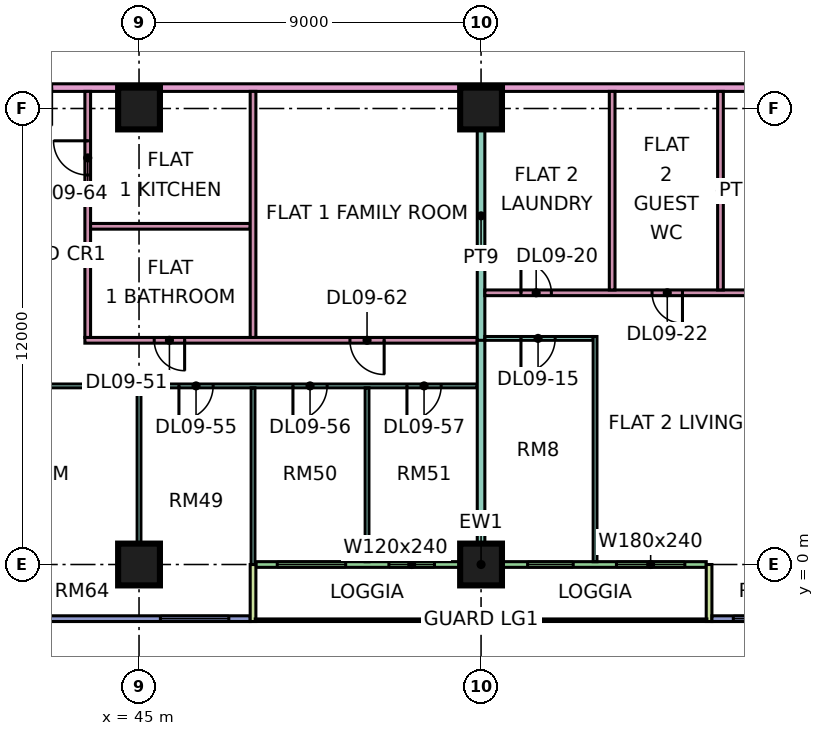
"""IFC4 building model, lengths in metres.
Left out: names, types, materials, properties, quantities, classifications, styles, units other than length and angle.
Written with IfcOpenShell. Run it as: python <this file> out.ifc"""

import sys

from ifc_helpers import new_model, si_unit, direction, frame, frame_2d, origin, origin_2d, place, context, subcontext, project, spatial, rectangle, extrude, element, fill, save


model = new_model("IFC4")
c1 = context("Model", 3, precision=1e-05, world=origin(), true_north=direction((0.0, 1.0)))
c2 = subcontext(c1, "Body", "Model", "MODEL_VIEW")
j1 = project(units=[si_unit("LENGTHUNIT", "METRE"), si_unit("PLANEANGLEUNIT", "RADIAN")], contexts=[c1])
p1 = place(None, origin())
s1 = spatial("IfcSite", under=j1, at=p1, CompositionType="ELEMENT")
p2 = place(p1, origin())
s2 = spatial("IfcBuilding", under=s1, at=p2, CompositionType="ELEMENT")
p3 = place(p2, frame((0.0, 0.0, 48.9)))
s3 = spatial("IfcBuildingStorey", under=s2, at=p3, CompositionType="ELEMENT", Elevation=48.9)
for number, where, z_axis, x_axis in (
    (1, (45.0, 0.0, 0.0), (0.0, 0.0, 1.0), (1.0, 0.0, 0.0)),
    (2, (45.0, 12.0, 0.0), (0.0, 0.0, 1.0), (1.0, 0.0, 0.0)),
    (3, (54.0, 0.0, 0.0), (0.0, 0.0, 1.0), (1.0, 0.0, 0.0)),
    (4, (54.0, 12.0, 0.0), (0.0, 0.0, 1.0), (1.0, 0.0, 0.0)),
):
    element("IfcColumn", number, at=place(p3, frame(where, z_axis=z_axis, x_axis=x_axis)), inside=s3, PredefinedType="COLUMN", context=c2, shape_type="SweptSolid", body=[
        extrude(rectangle(XDim=1.1, YDim=1.1, at=origin_2d()), origin(), (0.0, 0.0, 1.0), 3.75),
    ])
p4 = place(p3, frame((36.075, -1.425, 0.0), z_axis=(0.0, 0.0, 1.0), x_axis=(1.0, 0.0, 0.0)))
e5 = element("IfcWall", 5, at=p4, inside=s3, PredefinedType="SOLIDWALL", context=c2, shape_type="SweptSolid", body=[
    extrude(rectangle(XDim=11.85, YDim=0.15, at=frame_2d((5.925, 0.0))), origin(), (0.0, 0.0, 1.0), 3.35),
])
p5 = place(p4, frame((2.962, 0.0, 0.45)))
e6 = element("IfcOpeningElement", 6, at=p5, cuts=e5, PredefinedType="OPENING", context=c2, shape_type="SweptSolid", body=[
    extrude(rectangle(XDim=3.0, YDim=2.4, at=frame_2d((1.5, 1.2))), frame((0.0, 0.085, 0.0), z_axis=(0.0, -1.0, 0.0), x_axis=(1.0, 0.0, 0.0)), (0.0, 0.0, 1.0), 0.17),
])
p6 = place(p4, frame((9.488, 0.0, 0.45)))
e7 = element("IfcOpeningElement", 7, at=p6, cuts=e5, PredefinedType="OPENING", context=c2, shape_type="SweptSolid", body=[
    extrude(rectangle(XDim=1.8, YDim=2.4, at=frame_2d((0.9, 1.2))), frame((0.0, 0.085, 0.0), z_axis=(0.0, -1.0, 0.0), x_axis=(1.0, 0.0, 0.0)), (0.0, 0.0, 1.0), 0.17),
])
p7 = place(p3, frame((48.075, 0.0, 0.0), z_axis=(0.0, 0.0, 1.0), x_axis=(1.0, 0.0, 0.0)))
e8 = element("IfcWall", 8, at=p7, inside=s3, PredefinedType="SOLIDWALL", context=c2, shape_type="SweptSolid", body=[
    extrude(rectangle(XDim=11.85, YDim=0.15, at=frame_2d((5.925, 0.0))), origin(), (0.0, 0.0, 1.0), 3.35),
])
p8 = place(p7, frame((0.562, 0.0, 0.45)))
e9 = element("IfcOpeningElement", 9, at=p8, cuts=e8, PredefinedType="OPENING", context=c2, shape_type="SweptSolid", body=[
    extrude(rectangle(XDim=1.8, YDim=2.4, at=frame_2d((0.9, 1.2))), frame((0.0, 0.085, 0.0), z_axis=(0.0, -1.0, 0.0), x_axis=(1.0, 0.0, 0.0)), (0.0, 0.0, 1.0), 0.17),
])
p9 = place(p7, frame((3.5, 0.0, 0.45)))
e10 = element("IfcOpeningElement", 10, at=p9, cuts=e8, PredefinedType="OPENING", context=c2, shape_type="SweptSolid", body=[
    extrude(rectangle(XDim=1.2, YDim=2.4, at=frame_2d((0.6, 1.2))), frame((0.0, 0.085, 0.0), z_axis=(0.0, -1.0, 0.0), x_axis=(1.0, 0.0, 0.0)), (0.0, 0.0, 1.0), 0.17),
])
p10 = place(p7, frame((7.15, 0.0, 0.45)))
e11 = element("IfcOpeningElement", 11, at=p10, cuts=e8, PredefinedType="OPENING", context=c2, shape_type="SweptSolid", body=[
    extrude(rectangle(XDim=1.2, YDim=2.4, at=frame_2d((0.6, 1.2))), frame((0.0, 0.085, 0.0), z_axis=(0.0, -1.0, 0.0), x_axis=(1.0, 0.0, 0.0)), (0.0, 0.0, 1.0), 0.17),
])
p11 = place(p7, frame((9.488, 0.0, 0.45)))
e12 = element("IfcOpeningElement", 12, at=p11, cuts=e8, PredefinedType="OPENING", context=c2, shape_type="SweptSolid", body=[
    extrude(rectangle(XDim=1.8, YDim=2.4, at=frame_2d((0.9, 1.2))), frame((0.0, 0.085, 0.0), z_axis=(0.0, -1.0, 0.0), x_axis=(1.0, 0.0, 0.0)), (0.0, 0.0, 1.0), 0.17),
])
for number, where, z_axis, x_axis in (
    (13, (48.0, -1.5, 0.0), (0.0, 0.0, 1.0), (0.0, 1.0, 0.0)),
    (14, (60.0, -1.5, 0.0), (0.0, 0.0, 1.0), (0.0, 1.0, 0.0)),
):
    element("IfcWall", number, at=place(p3, frame(where, z_axis=z_axis, x_axis=x_axis)), inside=s3, PredefinedType="SOLIDWALL", context=c2, shape_type="SweptSolid", body=[
        extrude(rectangle(XDim=1.5, YDim=0.15, at=frame_2d((0.75, 0.0))), origin(), (0.0, 0.0, 1.0), 3.35),
    ])
p12 = place(p3, frame((60.075, -1.425, 0.0), z_axis=(0.0, 0.0, 1.0), x_axis=(1.0, 0.0, 0.0)))
e15 = element("IfcWall", 15, at=p12, inside=s3, PredefinedType="SOLIDWALL", context=c2, shape_type="SweptSolid", body=[
    extrude(rectangle(XDim=10.425, YDim=0.15, at=frame_2d((5.212, 0.0))), origin(), (0.0, 0.0, 1.0), 3.35),
])
p13 = place(p12, frame((0.562, 0.0, 0.45)))
e16 = element("IfcOpeningElement", 16, at=p13, cuts=e15, PredefinedType="OPENING", context=c2, shape_type="SweptSolid", body=[
    extrude(rectangle(XDim=1.8, YDim=2.4, at=frame_2d((0.9, 1.2))), frame((0.0, 0.085, 0.0), z_axis=(0.0, -1.0, 0.0), x_axis=(1.0, 0.0, 0.0)), (0.0, 0.0, 1.0), 0.17),
])
p14 = place(p12, frame((3.525, 0.0, 0.45)))
e17 = element("IfcOpeningElement", 17, at=p14, cuts=e15, PredefinedType="OPENING", context=c2, shape_type="SweptSolid", body=[
    extrude(rectangle(XDim=1.8, YDim=2.4, at=frame_2d((0.9, 1.2))), frame((0.0, 0.085, 0.0), z_axis=(0.0, -1.0, 0.0), x_axis=(1.0, 0.0, 0.0)), (0.0, 0.0, 1.0), 0.17),
])
p15 = place(p12, frame((6.675, 0.0, 0.45)))
e18 = element("IfcOpeningElement", 18, at=p15, cuts=e15, PredefinedType="OPENING", context=c2, shape_type="SweptSolid", body=[
    extrude(rectangle(XDim=3.0, YDim=2.4, at=frame_2d((1.5, 1.2))), frame((0.0, 0.085, 0.0), z_axis=(0.0, -1.0, 0.0), x_axis=(1.0, 0.0, 0.0)), (0.0, 0.0, 1.0), 0.17),
])
p16 = place(p3, frame((33.05, 4.7, 0.0), z_axis=(0.0, 0.0, 1.0), x_axis=(1.0, 0.0, 0.0)))
e19 = element("IfcWall", 19, at=p16, inside=s3, PredefinedType="PARTITIONING", context=c2, shape_type="SweptSolid", body=[
    extrude(rectangle(XDim=20.85, YDim=0.1, at=frame_2d((10.425, 0.0))), origin(), (0.0, 0.0, 1.0), 3.35),
])
p17 = place(p16, frame((1.0, 0.0, 0.0)))
e20 = element("IfcOpeningElement", 20, at=p17, cuts=e19, PredefinedType="OPENING", context=c2, shape_type="SweptSolid", body=[
    extrude(rectangle(XDim=0.9, YDim=2.1, at=frame_2d((0.45, 1.05))), frame((0.0, 0.06, 0.0), z_axis=(0.0, -1.0, 0.0), x_axis=(1.0, 0.0, 0.0)), (0.0, 0.0, 1.0), 0.12),
])
p18 = place(p16, frame((13.0, 0.0, 0.0)))
e21 = element("IfcOpeningElement", 21, at=p18, cuts=e19, PredefinedType="OPENING", context=c2, shape_type="SweptSolid", body=[
    extrude(rectangle(XDim=0.9, YDim=2.1, at=frame_2d((0.45, 1.05))), frame((0.0, 0.06, 0.0), z_axis=(0.0, -1.0, 0.0), x_axis=(1.0, 0.0, 0.0)), (0.0, 0.0, 1.0), 0.12),
])
p19 = place(p16, frame((16.0, 0.0, 0.0)))
e22 = element("IfcOpeningElement", 22, at=p19, cuts=e19, PredefinedType="OPENING", context=c2, shape_type="SweptSolid", body=[
    extrude(rectangle(XDim=0.9, YDim=2.1, at=frame_2d((0.45, 1.05))), frame((0.0, 0.06, 0.0), z_axis=(0.0, -1.0, 0.0), x_axis=(1.0, 0.0, 0.0)), (0.0, 0.0, 1.0), 0.12),
])
p20 = place(p16, frame((19.0, 0.0, 0.0)))
e23 = element("IfcOpeningElement", 23, at=p20, cuts=e19, PredefinedType="OPENING", context=c2, shape_type="SweptSolid", body=[
    extrude(rectangle(XDim=0.9, YDim=2.1, at=frame_2d((0.45, 1.05))), frame((0.0, 0.06, 0.0), z_axis=(0.0, -1.0, 0.0), x_axis=(1.0, 0.0, 0.0)), (0.0, 0.0, 1.0), 0.12),
])
p21 = place(p16, frame((7.0, 0.0, 0.0)))
e24 = element("IfcOpeningElement", 24, at=p21, cuts=e19, PredefinedType="OPENING", context=c2, shape_type="SweptSolid", body=[
    extrude(rectangle(XDim=0.9, YDim=2.1, at=frame_2d((0.45, 1.05))), frame((0.0, 0.06, 0.0), z_axis=(0.0, -1.0, 0.0), x_axis=(1.0, 0.0, 0.0)), (0.0, 0.0, 1.0), 0.12),
])
p22 = place(p3, frame((40.65, 12.55, 0.0), z_axis=(0.0, 0.0, 1.0), x_axis=(1.0, 0.0, 0.0)))
e25 = element("IfcWall", 25, at=p22, inside=s3, PredefinedType="PARTITIONING", context=c2, shape_type="SweptSolid", body=[
    extrude(rectangle(XDim=31.35, YDim=0.2, at=frame_2d((15.675, 0.0))), origin(), (0.0, 0.0, 1.0), 3.35),
])
p23 = place(p22, frame((24.0, 0.0, 0.0)))
e26 = element("IfcOpeningElement", 26, at=p23, cuts=e25, PredefinedType="OPENING", context=c2, shape_type="SweptSolid", body=[
    extrude(rectangle(XDim=1.0, YDim=2.1, at=frame_2d((0.5, 1.05))), frame((0.0, 0.11, 0.0), z_axis=(0.0, -1.0, 0.0), x_axis=(1.0, 0.0, 0.0)), (0.0, 0.0, 1.0), 0.22),
])
p24 = place(p22, frame((1.05, 0.0, 0.0)))
e27 = element("IfcOpeningElement", 27, at=p24, cuts=e25, PredefinedType="OPENING", context=c2, shape_type="SweptSolid", body=[
    extrude(rectangle(XDim=1.0, YDim=2.1, at=frame_2d((0.5, 1.05))), frame((0.0, 0.11, 0.0), z_axis=(0.0, -1.0, 0.0), x_axis=(1.0, 0.0, 0.0)), (0.0, 0.0, 1.0), 0.22),
])
p25 = place(p3, frame((43.575, 5.9, 0.0), z_axis=(0.0, 0.0, 1.0), x_axis=(1.0, 0.0, 0.0)))
e28 = element("IfcWall", 28, at=p25, inside=s3, PredefinedType="PARTITIONING", context=c2, shape_type="SweptSolid", body=[
    extrude(rectangle(XDim=10.325, YDim=0.15, at=frame_2d((5.163, 0.0))), origin(), (0.0, 0.0, 1.0), 3.35),
])
p26 = place(p25, frame((1.825, 0.0, 0.0)))
e29 = element("IfcOpeningElement", 29, at=p26, cuts=e28, PredefinedType="OPENING", context=c2, shape_type="SweptSolid", body=[
    extrude(rectangle(XDim=0.8, YDim=2.1, at=frame_2d((0.4, 1.05))), frame((0.0, 0.085, 0.0), z_axis=(0.0, -1.0, 0.0), x_axis=(1.0, 0.0, 0.0)), (0.0, 0.0, 1.0), 0.17),
])
p27 = place(p25, frame((6.975, 0.0, 0.0)))
e30 = element("IfcOpeningElement", 30, at=p27, cuts=e28, PredefinedType="OPENING", context=c2, shape_type="SweptSolid", body=[
    extrude(rectangle(XDim=0.9, YDim=2.1, at=frame_2d((0.45, 1.05))), frame((0.0, 0.085, 0.0), z_axis=(0.0, -1.0, 0.0), x_axis=(1.0, 0.0, 0.0)), (0.0, 0.0, 1.0), 0.17),
])
p28 = place(p3, frame((43.65, 5.975, 0.0), z_axis=(0.0, 0.0, 1.0), x_axis=(0.0, 1.0, 0.0)))
e31 = element("IfcWall", 31, at=p28, inside=s3, PredefinedType="PARTITIONING", context=c2, shape_type="SweptSolid", body=[
    extrude(rectangle(XDim=6.475, YDim=0.15, at=frame_2d((3.237, 0.0))), origin(), (0.0, 0.0, 1.0), 3.35),
])
p29 = place(p28, frame((4.275, 0.0, 0.0)))
e32 = element("IfcOpeningElement", 32, at=p29, cuts=e31, PredefinedType="OPENING", context=c2, shape_type="SweptSolid", body=[
    extrude(rectangle(XDim=0.9, YDim=2.1, at=frame_2d((0.45, 1.05))), frame((0.0, 0.085, 0.0), z_axis=(0.0, -1.0, 0.0), x_axis=(1.0, 0.0, 0.0)), (0.0, 0.0, 1.0), 0.17),
])
p30 = place(p3, frame((43.725, 8.9, 0.0), z_axis=(0.0, 0.0, 1.0), x_axis=(1.0, 0.0, 0.0)))
e33 = element("IfcWall", 33, at=p30, inside=s3, PredefinedType="PARTITIONING", context=c2, shape_type="SweptSolid", body=[
    extrude(rectangle(XDim=4.2, YDim=0.15, at=frame_2d((2.1, 0.0))), origin(), (0.0, 0.0, 1.0), 3.35),
])
for number, where, z_axis, x_axis in (
    (34, (45.0, 0.0, 0.0), (0.0, 0.0, 1.0), (0.0, 1.0, 0.0)),
    (35, (48.0, 0.0, 0.0), (0.0, 0.0, 1.0), (0.0, 1.0, 0.0)),
):
    element("IfcWall", number, at=place(p3, frame(where, z_axis=z_axis, x_axis=x_axis)), inside=s3, PredefinedType="PARTITIONING", context=c2, shape_type="SweptSolid", body=[
        extrude(rectangle(XDim=4.65, YDim=0.1, at=frame_2d((2.325, 0.0))), origin(), (0.0, 0.0, 1.0), 3.35),
    ])
p31 = place(p3, frame((48.0, 5.975, 0.0), z_axis=(0.0, 0.0, 1.0), x_axis=(0.0, 1.0, 0.0)))
e36 = element("IfcWall", 36, at=p31, inside=s3, PredefinedType="PARTITIONING", context=c2, shape_type="SweptSolid", body=[
    extrude(rectangle(XDim=6.475, YDim=0.15, at=frame_2d((3.237, 0.0))), origin(), (0.0, 0.0, 1.0), 3.35),
])
p32 = place(p3, frame((51.0, 0.074, 0.0), z_axis=(0.0, 0.0, 1.0), x_axis=(0.0, 1.0, 0.0)))
e37 = element("IfcWall", 37, at=p32, inside=s3, PredefinedType="PARTITIONING", context=c2, shape_type="SweptSolid", body=[
    extrude(rectangle(XDim=4.576, YDim=0.1, at=frame_2d((2.288, 0.0))), origin(), (0.0, 0.0, 1.0), 3.35),
])
p33 = place(p3, frame((54.0, 0.074, 0.0), z_axis=(0.0, 0.0, 1.0), x_axis=(0.0, 1.0, 0.0)))
e38 = element("IfcWall", 38, at=p33, inside=s3, PredefinedType="PARTITIONING", context=c2, shape_type="SweptSolid", body=[
    extrude(rectangle(XDim=5.901, YDim=0.2, at=frame_2d((2.951, 0.0))), origin(), (0.0, 0.0, 1.0), 3.35),
])
p34 = place(p3, frame((54.0, 5.9, 0.0), z_axis=(0.0, 0.0, 1.0), x_axis=(0.0, 1.0, 0.0)))
e39 = element("IfcWall", 39, at=p34, inside=s3, PredefinedType="PARTITIONING", context=c2, shape_type="SweptSolid", body=[
    extrude(rectangle(XDim=6.55, YDim=0.2, at=frame_2d((3.275, 0.0))), origin(), (0.0, 0.0, 1.0), 3.35),
])
p35 = place(p3, frame((54.1, 5.95, 0.0), z_axis=(0.0, 0.0, 1.0), x_axis=(1.0, 0.0, 0.0)))
e40 = element("IfcWall", 40, at=p35, inside=s3, PredefinedType="PARTITIONING", context=c2, shape_type="SweptSolid", body=[
    extrude(rectangle(XDim=2.85, YDim=0.1, at=frame_2d((1.425, 0.0))), origin(), (0.0, 0.0, 1.0), 3.35),
])
p36 = place(p35, frame((0.95, 0.0, 0.0)))
e41 = element("IfcOpeningElement", 41, at=p36, cuts=e40, PredefinedType="OPENING", context=c2, shape_type="SweptSolid", body=[
    extrude(rectangle(XDim=0.9, YDim=2.1, at=frame_2d((0.45, 1.05))), frame((0.0, 0.06, 0.0), z_axis=(0.0, -1.0, 0.0), x_axis=(1.0, 0.0, 0.0)), (0.0, 0.0, 1.0), 0.12),
])
p37 = place(p3, frame((54.1, 7.15, 0.0), z_axis=(0.0, 0.0, 1.0), x_axis=(1.0, 0.0, 0.0)))
e42 = element("IfcWall", 42, at=p37, inside=s3, PredefinedType="PARTITIONING", context=c2, shape_type="SweptSolid", body=[
    extrude(rectangle(XDim=9.575, YDim=0.15, at=frame_2d((4.788, 0.0))), origin(), (0.0, 0.0, 1.0), 3.35),
])
p38 = place(p37, frame((7.55, 0.0, 0.0)))
e43 = element("IfcOpeningElement", 43, at=p38, cuts=e42, PredefinedType="OPENING", context=c2, shape_type="SweptSolid", body=[
    extrude(rectangle(XDim=0.8, YDim=2.1, at=frame_2d((0.4, 1.05))), frame((0.0, 0.085, 0.0), z_axis=(0.0, -1.0, 0.0), x_axis=(1.0, 0.0, 0.0)), (0.0, 0.0, 1.0), 0.17),
])
p39 = place(p37, frame((0.95, 0.0, 0.0)))
e44 = element("IfcOpeningElement", 44, at=p39, cuts=e42, PredefinedType="OPENING", context=c2, shape_type="SweptSolid", body=[
    extrude(rectangle(XDim=0.8, YDim=2.1, at=frame_2d((0.4, 1.05))), frame((0.0, 0.085, 0.0), z_axis=(0.0, -1.0, 0.0), x_axis=(1.0, 0.0, 0.0)), (0.0, 0.0, 1.0), 0.17),
])
p40 = place(p37, frame((4.4, 0.0, 0.0)))
e45 = element("IfcOpeningElement", 45, at=p40, cuts=e42, PredefinedType="OPENING", context=c2, shape_type="SweptSolid", body=[
    extrude(rectangle(XDim=0.8, YDim=2.1, at=frame_2d((0.4, 1.05))), frame((0.0, 0.085, 0.0), z_axis=(0.0, -1.0, 0.0), x_axis=(1.0, 0.0, 0.0)), (0.0, 0.0, 1.0), 0.17),
])
p41 = place(p3, frame((57.0, 0.074, 0.0), z_axis=(0.0, 0.0, 1.0), x_axis=(0.0, 1.0, 0.0)))
e46 = element("IfcWall", 46, at=p41, inside=s3, PredefinedType="PARTITIONING", context=c2, shape_type="SweptSolid", body=[
    extrude(rectangle(XDim=5.926, YDim=0.1, at=frame_2d((2.963, 0.0))), origin(), (0.0, 0.0, 1.0), 3.35),
])
for number, where, z_axis, x_axis in (
    (47, (57.45, 7.225, 0.0), (0.0, 0.0, 1.0), (0.0, 1.0, 0.0)),
    (48, (60.3, 7.225, 0.0), (0.0, 0.0, 1.0), (0.0, 1.0, 0.0)),
):
    element("IfcWall", number, at=place(p3, frame(where, z_axis=z_axis, x_axis=x_axis)), inside=s3, PredefinedType="PARTITIONING", context=c2, shape_type="SweptSolid", body=[
        extrude(rectangle(XDim=5.225, YDim=0.15, at=frame_2d((2.612, 0.0))), origin(), (0.0, 0.0, 1.0), 3.35),
    ])
p42 = place(p6, origin())
e49 = element("IfcWindow", 49, at=p42, inside=s3, PartitioningType="SINGLE_PANEL", PredefinedType="WINDOW", context=c2, shape_type="SweptSolid", body=[
    extrude(rectangle(XDim=1.8, YDim=2.4, at=frame_2d((0.9, 1.2))), frame((0.0, 0.03, 0.0), z_axis=(0.0, -1.0, 0.0), x_axis=(1.0, 0.0, 0.0)), (0.0, 0.0, 1.0), 0.06),
])
fill(e7, e49)
p43 = place(p8, origin())
e50 = element("IfcWindow", 50, at=p43, inside=s3, PartitioningType="SINGLE_PANEL", PredefinedType="WINDOW", context=c2, shape_type="SweptSolid", body=[
    extrude(rectangle(XDim=1.8, YDim=2.4, at=frame_2d((0.9, 1.2))), frame((0.0, 0.03, 0.0), z_axis=(0.0, -1.0, 0.0), x_axis=(1.0, 0.0, 0.0)), (0.0, 0.0, 1.0), 0.06),
])
fill(e9, e50)
p44 = place(p9, origin())
e51 = element("IfcWindow", 51, at=p44, inside=s3, PartitioningType="SINGLE_PANEL", PredefinedType="WINDOW", context=c2, shape_type="SweptSolid", body=[
    extrude(rectangle(XDim=1.2, YDim=2.4, at=frame_2d((0.6, 1.2))), frame((0.0, 0.03, 0.0), z_axis=(0.0, -1.0, 0.0), x_axis=(1.0, 0.0, 0.0)), (0.0, 0.0, 1.0), 0.06),
])
fill(e10, e51)
p45 = place(p10, origin())
e52 = element("IfcWindow", 52, at=p45, inside=s3, PartitioningType="SINGLE_PANEL", PredefinedType="WINDOW", context=c2, shape_type="SweptSolid", body=[
    extrude(rectangle(XDim=1.2, YDim=2.4, at=frame_2d((0.6, 1.2))), frame((0.0, 0.03, 0.0), z_axis=(0.0, -1.0, 0.0), x_axis=(1.0, 0.0, 0.0)), (0.0, 0.0, 1.0), 0.06),
])
fill(e11, e52)
p46 = place(p11, origin())
e53 = element("IfcWindow", 53, at=p46, inside=s3, PartitioningType="SINGLE_PANEL", PredefinedType="WINDOW", context=c2, shape_type="SweptSolid", body=[
    extrude(rectangle(XDim=1.8, YDim=2.4, at=frame_2d((0.9, 1.2))), frame((0.0, 0.03, 0.0), z_axis=(0.0, -1.0, 0.0), x_axis=(1.0, 0.0, 0.0)), (0.0, 0.0, 1.0), 0.06),
])
fill(e12, e53)
p47 = place(p13, origin())
e54 = element("IfcWindow", 54, at=p47, inside=s3, PartitioningType="SINGLE_PANEL", PredefinedType="WINDOW", context=c2, shape_type="SweptSolid", body=[
    extrude(rectangle(XDim=1.8, YDim=2.4, at=frame_2d((0.9, 1.2))), frame((0.0, 0.03, 0.0), z_axis=(0.0, -1.0, 0.0), x_axis=(1.0, 0.0, 0.0)), (0.0, 0.0, 1.0), 0.06),
])
fill(e16, e54)
p48 = place(p36, frame((0.9, 0.0, 0.0), z_axis=(0.0, 0.0, 1.0), x_axis=(-1.0, 0.0, 0.0)))
e55 = element("IfcDoor", 55, at=p48, inside=s3, OperationType="SINGLE_SWING_LEFT", PredefinedType="DOOR", context=c2, shape_type="SweptSolid", body=[
    extrude(rectangle(XDim=0.9, YDim=2.1, at=frame_2d((0.45, 1.05))), frame((0.0, 0.025, 0.0), z_axis=(0.0, -1.0, 0.0), x_axis=(1.0, 0.0, 0.0)), (0.0, 0.0, 1.0), 0.05),
])
fill(e41, e55)
p49 = place(p39, origin())
e56 = element("IfcDoor", 56, at=p49, inside=s3, OperationType="SINGLE_SWING_LEFT", PredefinedType="DOOR", context=c2, shape_type="SweptSolid", body=[
    extrude(rectangle(XDim=0.8, YDim=2.1, at=frame_2d((0.4, 1.05))), frame((0.0, 0.025, 0.0), z_axis=(0.0, -1.0, 0.0), x_axis=(1.0, 0.0, 0.0)), (0.0, 0.0, 1.0), 0.05),
])
fill(e44, e56)
p50 = place(p40, origin())
e57 = element("IfcDoor", 57, at=p50, inside=s3, OperationType="SINGLE_SWING_RIGHT", PredefinedType="DOOR", context=c2, shape_type="SweptSolid", body=[
    extrude(rectangle(XDim=0.8, YDim=2.1, at=frame_2d((0.4, 1.05))), frame((0.0, 0.025, 0.0), z_axis=(0.0, -1.0, 0.0), x_axis=(1.0, 0.0, 0.0)), (0.0, 0.0, 1.0), 0.05),
])
fill(e45, e57)
p51 = place(p26, origin())
e58 = element("IfcDoor", 58, at=p51, inside=s3, OperationType="SINGLE_SWING_RIGHT", PredefinedType="DOOR", context=c2, shape_type="SweptSolid", body=[
    extrude(rectangle(XDim=0.8, YDim=2.1, at=frame_2d((0.4, 1.05))), frame((0.0, 0.025, 0.0), z_axis=(0.0, -1.0, 0.0), x_axis=(1.0, 0.0, 0.0)), (0.0, 0.0, 1.0), 0.05),
])
fill(e29, e58)
p52 = place(p18, frame((0.9, 0.0, 0.0), z_axis=(0.0, 0.0, 1.0), x_axis=(-1.0, 0.0, 0.0)))
e59 = element("IfcDoor", 59, at=p52, inside=s3, OperationType="SINGLE_SWING_LEFT", PredefinedType="DOOR", context=c2, shape_type="SweptSolid", body=[
    extrude(rectangle(XDim=0.9, YDim=2.1, at=frame_2d((0.45, 1.05))), frame((0.0, 0.025, 0.0), z_axis=(0.0, -1.0, 0.0), x_axis=(1.0, 0.0, 0.0)), (0.0, 0.0, 1.0), 0.05),
])
fill(e21, e59)
p53 = place(p19, frame((0.9, 0.0, 0.0), z_axis=(0.0, 0.0, 1.0), x_axis=(-1.0, 0.0, 0.0)))
e60 = element("IfcDoor", 60, at=p53, inside=s3, OperationType="SINGLE_SWING_LEFT", PredefinedType="DOOR", context=c2, shape_type="SweptSolid", body=[
    extrude(rectangle(XDim=0.9, YDim=2.1, at=frame_2d((0.45, 1.05))), frame((0.0, 0.025, 0.0), z_axis=(0.0, -1.0, 0.0), x_axis=(1.0, 0.0, 0.0)), (0.0, 0.0, 1.0), 0.05),
])
fill(e22, e60)
p54 = place(p20, frame((0.9, 0.0, 0.0), z_axis=(0.0, 0.0, 1.0), x_axis=(-1.0, 0.0, 0.0)))
e61 = element("IfcDoor", 61, at=p54, inside=s3, OperationType="SINGLE_SWING_LEFT", PredefinedType="DOOR", context=c2, shape_type="SweptSolid", body=[
    extrude(rectangle(XDim=0.9, YDim=2.1, at=frame_2d((0.45, 1.05))), frame((0.0, 0.025, 0.0), z_axis=(0.0, -1.0, 0.0), x_axis=(1.0, 0.0, 0.0)), (0.0, 0.0, 1.0), 0.05),
])
fill(e23, e61)
p55 = place(p27, origin())
e62 = element("IfcDoor", 62, at=p55, inside=s3, OperationType="SINGLE_SWING_RIGHT", PredefinedType="DOOR", context=c2, shape_type="SweptSolid", body=[
    extrude(rectangle(XDim=0.9, YDim=2.1, at=frame_2d((0.45, 1.05))), frame((0.0, 0.025, 0.0), z_axis=(0.0, -1.0, 0.0), x_axis=(1.0, 0.0, 0.0)), (0.0, 0.0, 1.0), 0.05),
])
fill(e30, e62)
p56 = place(p29, frame((0.9, 0.0, 0.0), z_axis=(0.0, 0.0, 1.0), x_axis=(-1.0, 0.0, 0.0)))
e63 = element("IfcDoor", 63, at=p56, inside=s3, OperationType="SINGLE_SWING_RIGHT", PredefinedType="DOOR", context=c2, shape_type="SweptSolid", body=[
    extrude(rectangle(XDim=0.9, YDim=2.1, at=frame_2d((0.45, 1.05))), frame((0.0, 0.025, 0.0), z_axis=(0.0, -1.0, 0.0), x_axis=(1.0, 0.0, 0.0)), (0.0, 0.0, 1.0), 0.05),
])
fill(e32, e63)
save(model, sys.argv[1])
